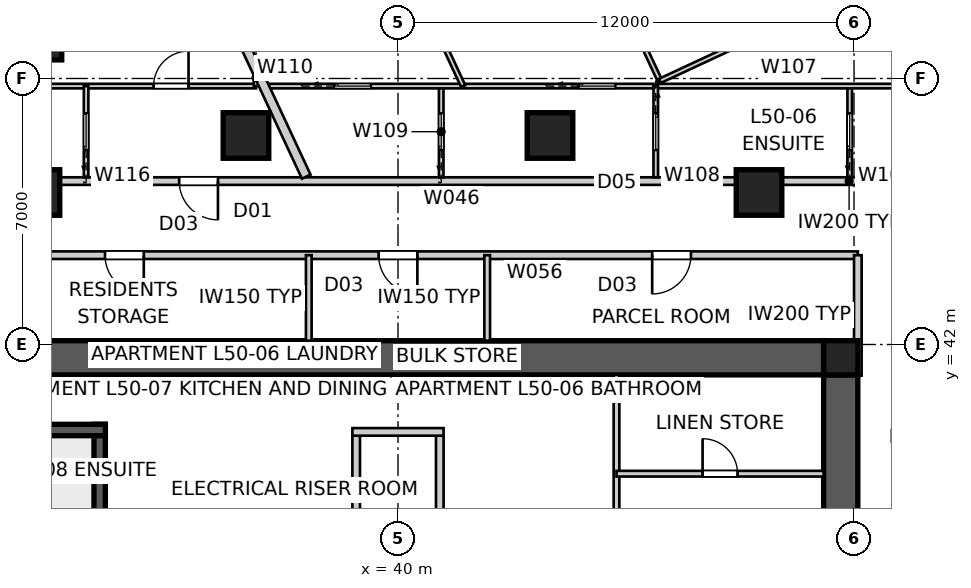
"""IFC4 building model, lengths in metres.
Left out: names, types, materials, properties, quantities, classifications, styles, units other than length and angle.
Written with IfcOpenShell. Run it as: python <this file> out.ifc"""

import sys

from ifc_helpers import new_model, si_unit, direction, frame, frame_2d, origin, origin_2d, place, context, subcontext, project, spatial, polyline, rectangle, outline, extrude, element, fill, save


model = new_model("IFC4")
c1 = context("Model", 3, precision=1e-05, world=origin(), true_north=direction((0.0, 1.0)))
c2 = subcontext(c1, "Body", "Model", "MODEL_VIEW")
j1 = project(units=[si_unit("LENGTHUNIT", "METRE"), si_unit("PLANEANGLEUNIT", "RADIAN")], contexts=[c1])
p1 = place(None, origin())
s1 = spatial("IfcSite", under=j1, at=p1, CompositionType="ELEMENT")
p2 = place(p1, origin())
s2 = spatial("IfcBuilding", under=s1, at=p2, CompositionType="ELEMENT")
p3 = place(p2, frame((0.0, 0.0, 182.8)))
s3 = spatial("IfcBuildingStorey", under=s2, at=p3, CompositionType="ELEMENT", Elevation=182.8)
p4 = place(p3, frame((28.8, 41.65, 0.0), z_axis=(0.0, 0.0, 1.0), x_axis=(1.0, 0.0, 0.0)))
e1 = element("IfcWall", 1, at=p4, inside=s3, PredefinedType="SHEAR", context=c2, shape_type="SweptSolid", body=[
    extrude(outline(polyline([(0.0, -0.45), (22.4, -0.45), (22.4, -0.025), (22.85, -0.025), (22.85, 0.025), (22.4, 0.025), (22.4, 0.45), (0.0, 0.45), (0.0, 0.025), (-0.45, 0.025), (-0.45, -0.025), (0.0, -0.025), (0.0, -0.45)])), origin(), (0.0, 0.0, 1.0), 3.4),
])
p5 = place(p3, frame((51.65, 18.8, 0.0), z_axis=(0.0, 0.0, 1.0), x_axis=(0.0, 1.0, 0.0)))
e2 = element("IfcWall", 2, at=p5, inside=s3, PredefinedType="SHEAR", context=c2, shape_type="SweptSolid", body=[
    extrude(outline(polyline([(0.0, -0.45), (22.4, -0.45), (22.4, -0.025), (22.85, -0.025), (22.85, 0.025), (22.4, 0.025), (22.4, 0.45), (0.0, 0.45), (0.0, 0.025), (-0.45, 0.025), (-0.45, -0.025), (0.0, -0.025), (0.0, -0.45)])), origin(), (0.0, 0.0, 1.0), 3.4),
])
p6 = place(p5, frame((11.14, 0.0, 0.0)))
e3 = element("IfcOpeningElement", 3, at=p6, cuts=e2, PredefinedType="OPENING", context=c2, shape_type="SweptSolid", body=[
    extrude(rectangle(XDim=1.02, YDim=2.4, at=frame_2d((0.51, 1.2))), frame((0.0, 0.46, 0.0), z_axis=(0.0, -1.0, 0.0), x_axis=(1.0, 0.0, 0.0)), (0.0, 0.0, 1.0), 0.92),
])
p7 = place(p3, frame((32.15, 32.2, 0.0), z_axis=(0.0, 0.0, 1.0), x_axis=(0.0, 1.0, 0.0)))
e4 = element("IfcWall", 4, at=p7, inside=s3, PredefinedType="SHEAR", context=c2, shape_type="SweptSolid", body=[
    extrude(rectangle(XDim=7.7, YDim=0.3, at=frame_2d((3.85, 0.0))), origin(), (0.0, 0.0, 1.0), 3.4),
])
p8 = place(p3, frame((28.8, 39.75, 0.0), z_axis=(0.0, 0.0, 1.0), x_axis=(1.0, 0.0, 0.0)))
e5 = element("IfcWall", 5, at=p8, inside=s3, PredefinedType="SHEAR", context=c2, shape_type="SweptSolid", body=[
    extrude(rectangle(XDim=3.5, YDim=0.3, at=frame_2d((1.75, 0.0))), origin(), (0.0, 0.0, 1.0), 3.4),
])
for number, where, z_axis, x_axis in (
    (6, (38.9, 37.6, 0.0), (0.0, 0.0, 1.0), (0.0, 1.0, 0.0)),
    (7, (41.1, 37.6, 0.0), (0.0, 0.0, 1.0), (0.0, 1.0, 0.0)),
):
    element("IfcWall", number, at=place(p3, frame(where, z_axis=z_axis, x_axis=x_axis)), inside=s3, PredefinedType="SOLIDWALL", context=c2, shape_type="SweptSolid", body=[
        extrude(rectangle(XDim=2.0, YDim=0.2, at=frame_2d((1.0, 0.0))), origin(), (0.0, 0.0, 1.0), 3.4),
    ])
p9 = place(p3, frame((38.8, 39.7, 0.0), z_axis=(0.0, 0.0, 1.0), x_axis=(1.0, 0.0, 0.0)))
e8 = element("IfcWall", 8, at=p9, inside=s3, PredefinedType="SOLIDWALL", context=c2, shape_type="SweptSolid", body=[
    extrude(rectangle(XDim=2.4, YDim=0.2, at=frame_2d((1.2, 0.0))), origin(), (0.0, 0.0, 1.0), 3.4),
])
for number, where, z_axis, x_axis in (
    (9, (51.65, 41.65, 0.0), (0.0, 0.0, 1.0), (1.0, 0.0, 0.0)),
    (10, (30.702, 49.939, 0.0), (0.0, 0.0, 1.0), (1.0, 0.0, 0.0)),
):
    element("IfcColumn", number, at=place(p3, frame(where, z_axis=z_axis, x_axis=x_axis)), inside=s3, PredefinedType="COLUMN", context=c2, shape_type="SweptSolid", body=[
        extrude(rectangle(XDim=0.9, YDim=0.9, at=origin_2d()), origin(), (0.0, 0.0, 1.0), 3.4),
    ])
for number, where, z_axis, x_axis in (
    (11, (49.5, 46.0, 0.0), (0.0, 0.0, 1.0), (1.0, 0.0, 0.0)),
    (12, (44.0, 47.5, 0.0), (0.0, 0.0, 1.0), (1.0, 0.0, 0.0)),
    (13, (36.0, 47.5, 0.0), (0.0, 0.0, 1.0), (1.0, 0.0, 0.0)),
    (14, (30.5, 46.0, 0.0), (0.0, 0.0, 1.0), (1.0, 0.0, 0.0)),
):
    element("IfcColumn", number, at=place(p3, frame(where, z_axis=z_axis, x_axis=x_axis)), inside=s3, PredefinedType="COLUMN", context=c2, shape_type="SweptSolid", body=[
        extrude(rectangle(XDim=1.2, YDim=1.2, at=origin_2d()), origin(), (0.0, 0.0, 1.0), 3.4),
    ])
p10 = place(p3, frame((54.5, 46.3, 0.0), z_axis=(0.0, 0.0, 1.0), x_axis=(-1.0, 0.0, 0.0)))
e15 = element("IfcWall", 15, at=p10, inside=s3, PredefinedType="PARTITIONING", context=c2, shape_type="SweptSolid", body=[
    extrude(rectangle(XDim=5.258, YDim=0.2, at=frame_2d((2.629, 0.0))), origin(), (0.0, 0.0, 1.0), 3.25),
])
p11 = place(p3, frame((49.242, 46.3, 0.0), z_axis=(0.0, 0.0, 1.0), x_axis=(-1.0, 0.0, 0.0)))
e16 = element("IfcWall", 16, at=p11, inside=s3, PredefinedType="PARTITIONING", context=c2, shape_type="SweptSolid", body=[
    extrude(rectangle(XDim=1.683, YDim=0.2, at=frame_2d((0.842, 0.0))), origin(), (0.0, 0.0, 1.0), 2.55),
])
p12 = place(p3, frame((47.558, 46.3, 0.0), z_axis=(0.0, 0.0, 1.0), x_axis=(-1.0, 0.0, 0.0)))
e17 = element("IfcWall", 17, at=p12, inside=s3, PredefinedType="PARTITIONING", context=c2, shape_type="SweptSolid", body=[
    extrude(rectangle(XDim=15.117, YDim=0.2, at=frame_2d((7.558, 0.0))), origin(), (0.0, 0.0, 1.0), 3.25),
])
p13 = place(p12, frame((12.295, 0.0, 0.0)))
e18 = element("IfcOpeningElement", 18, at=p13, cuts=e17, PredefinedType="OPENING", context=c2, shape_type="SweptSolid", body=[
    extrude(rectangle(XDim=1.02, YDim=2.34, at=frame_2d((0.51, 1.17))), frame((0.0, 0.11, 0.0), z_axis=(0.0, -1.0, 0.0), x_axis=(1.0, 0.0, 0.0)), (0.0, 0.0, 1.0), 0.22),
])
p14 = place(p3, frame((32.442, 46.3, 0.0), z_axis=(0.0, 0.0, 1.0), x_axis=(-1.0, 0.0, 0.0)))
e19 = element("IfcWall", 19, at=p14, inside=s3, PredefinedType="PARTITIONING", context=c2, shape_type="SweptSolid", body=[
    extrude(rectangle(XDim=1.683, YDim=0.2, at=frame_2d((0.842, 0.0))), origin(), (0.0, 0.0, 1.0), 2.55),
])
p15 = place(p3, frame((34.585, 52.853, 0.0), z_axis=(0.0, 0.0, 1.0), x_axis=(0.422623839356, -0.906305186131, 0.0)))
e20 = element("IfcWall", 20, at=p15, inside=s3, PredefinedType="PARTITIONING", context=c2, shape_type="SweptSolid", body=[
    extrude(rectangle(XDim=7.101, YDim=0.25, at=frame_2d((3.551, 0.0))), origin(), (0.0, 0.0, 1.0), 3.25),
])
p16 = place(p3, frame((45.75, 41.2, 0.0), z_axis=(0.0, 0.0, 1.0), x_axis=(0.0, -1.0, 0.0)))
e21 = element("IfcWall", 21, at=p16, inside=s3, PredefinedType="SOLIDWALL", context=c2, shape_type="SweptSolid", body=[
    extrude(rectangle(XDim=5.9, YDim=0.15, at=frame_2d((2.95, 0.0))), origin(), (0.0, 0.0, 1.0), 3.25),
])
p17 = place(p3, frame((45.75, 38.6, 0.0), z_axis=(0.0, 0.0, 1.0), x_axis=(1.0, 0.0, 0.0)))
e22 = element("IfcWall", 22, at=p17, inside=s3, PredefinedType="SOLIDWALL", context=c2, shape_type="SweptSolid", body=[
    extrude(rectangle(XDim=5.45, YDim=0.15, at=frame_2d((2.725, 0.0))), origin(), (0.0, 0.0, 1.0), 3.25),
])
p18 = place(p17, frame((2.265, 0.0, 0.0)))
e23 = element("IfcOpeningElement", 23, at=p18, cuts=e22, PredefinedType="OPENING", context=c2, shape_type="SweptSolid", body=[
    extrude(rectangle(XDim=0.92, YDim=2.1, at=frame_2d((0.46, 1.05))), frame((0.0, 0.085, 0.0), z_axis=(0.0, -1.0, 0.0), x_axis=(1.0, 0.0, 0.0)), (0.0, 0.0, 1.0), 0.17),
])
p19 = place(p3, frame((52.1, 44.35, 0.0), z_axis=(0.0, 0.0, 1.0), x_axis=(-1.0, 0.0, 0.0)))
e24 = element("IfcWall", 24, at=p19, inside=s3, PredefinedType="PARTITIONING", context=c2, shape_type="SweptSolid", body=[
    extrude(rectangle(XDim=24.2, YDim=0.2, at=frame_2d((12.1, 0.0))), origin(), (0.0, 0.0, 1.0), 3.25),
])
p20 = place(p19, frame((18.789, 0.0, 0.0)))
e25 = element("IfcOpeningElement", 25, at=p20, cuts=e24, PredefinedType="OPENING", context=c2, shape_type="SweptSolid", body=[
    extrude(rectangle(XDim=1.02, YDim=2.1, at=frame_2d((0.51, 1.05))), frame((0.0, 0.11, 0.0), z_axis=(0.0, -1.0, 0.0), x_axis=(1.0, 0.0, 0.0)), (0.0, 0.0, 1.0), 0.22),
])
p21 = place(p19, frame((4.391, 0.0, 0.0)))
e26 = element("IfcOpeningElement", 26, at=p21, cuts=e24, PredefinedType="OPENING", context=c2, shape_type="SweptSolid", body=[
    extrude(rectangle(XDim=1.02, YDim=2.1, at=frame_2d((0.51, 1.05))), frame((0.0, 0.11, 0.0), z_axis=(0.0, -1.0, 0.0), x_axis=(1.0, 0.0, 0.0)), (0.0, 0.0, 1.0), 0.22),
])
p22 = place(p19, frame((11.59, 0.0, 0.0)))
e27 = element("IfcOpeningElement", 27, at=p22, cuts=e24, PredefinedType="OPENING", context=c2, shape_type="SweptSolid", body=[
    extrude(rectangle(XDim=1.02, YDim=2.1, at=frame_2d((0.51, 1.05))), frame((0.0, 0.11, 0.0), z_axis=(0.0, -1.0, 0.0), x_axis=(1.0, 0.0, 0.0)), (0.0, 0.0, 1.0), 0.22),
])
p23 = place(p3, frame((52.1, 41.18, 0.0), z_axis=(0.0, 0.0, 1.0), x_axis=(0.0, 1.0, 0.0)))
e28 = element("IfcWall", 28, at=p23, inside=s3, PredefinedType="PARTITIONING", context=c2, shape_type="SweptSolid", body=[
    extrude(rectangle(XDim=3.17, YDim=0.2, at=frame_2d((1.585, 0.0))), origin(), (0.0, 0.0, 1.0), 3.25),
])
for number, where, z_axis, x_axis in (
    (29, (37.653, 42.1, 0.0), (0.0, 0.0, 1.0), (0.0, 1.0, 0.0)),
    (30, (42.347, 42.1, 0.0), (0.0, 0.0, 1.0), (0.0, 1.0, 0.0)),
):
    element("IfcWall", number, at=place(p3, frame(where, z_axis=z_axis, x_axis=x_axis)), inside=s3, PredefinedType="SOLIDWALL", context=c2, shape_type="SweptSolid", body=[
        extrude(rectangle(XDim=2.25, YDim=0.15, at=frame_2d((1.125, 0.0))), origin(), (0.0, 0.0, 1.0), 3.25),
    ])
p24 = place(p3, frame((51.886, 46.4, 0.0), z_axis=(0.0, 0.0, 1.0), x_axis=(0.0, 1.0, 0.0)))
e31 = element("IfcWall", 31, at=p24, inside=s3, PredefinedType="PARTITIONING", context=c2, shape_type="SweptSolid", body=[
    extrude(rectangle(XDim=2.4, YDim=0.12, at=frame_2d((1.2, 0.0))), origin(), (0.0, 0.0, 1.0), 3.25),
])
p25 = place(p24, frame((0.72, 0.0, 0.0)))
e32 = element("IfcOpeningElement", 32, at=p25, cuts=e31, PredefinedType="OPENING", context=c2, shape_type="SweptSolid", body=[
    extrude(rectangle(XDim=0.96, YDim=2.1, at=frame_2d((0.48, 1.05))), frame((0.0, 0.07, 0.0), z_axis=(0.0, -1.0, 0.0), x_axis=(1.0, 0.0, 0.0)), (0.0, 0.0, 1.0), 0.14),
])
p26 = place(p3, frame((46.783, 48.8, 0.0), z_axis=(0.0, 0.0, 1.0), x_axis=(1.0, 0.0, 0.0)))
e33 = element("IfcWall", 33, at=p26, inside=s3, PredefinedType="PARTITIONING", context=c2, shape_type="SweptSolid", body=[
    extrude(rectangle(XDim=9.784, YDim=0.12, at=frame_2d((4.892, 0.0))), origin(), (0.0, 0.0, 1.0), 3.25),
])
p27 = place(p26, frame((7.006, 0.0, 0.0)))
e34 = element("IfcOpeningElement", 34, at=p27, cuts=e33, PredefinedType="OPENING", context=c2, shape_type="SweptSolid", body=[
    extrude(rectangle(XDim=0.92, YDim=2.34, at=frame_2d((0.46, 1.17))), frame((0.0, 0.07, 0.0), z_axis=(0.0, -1.0, 0.0), x_axis=(1.0, 0.0, 0.0)), (0.0, 0.0, 1.0), 0.14),
])
p28 = place(p3, frame((46.783, 48.8, 0.0), z_axis=(0.0, 0.0, 1.0), x_axis=(0.0, -1.0, 0.0)))
e35 = element("IfcWall", 35, at=p28, inside=s3, PredefinedType="PARTITIONING", context=c2, shape_type="SweptSolid", body=[
    extrude(rectangle(XDim=2.4, YDim=0.12, at=frame_2d((1.2, 0.0))), origin(), (0.0, 0.0, 1.0), 3.25),
])
p29 = place(p28, frame((0.72, 0.0, 0.0)))
e36 = element("IfcOpeningElement", 36, at=p29, cuts=e35, PredefinedType="OPENING", context=c2, shape_type="SweptSolid", body=[
    extrude(rectangle(XDim=0.96, YDim=2.1, at=frame_2d((0.48, 1.05))), frame((0.0, 0.07, 0.0), z_axis=(0.0, -1.0, 0.0), x_axis=(1.0, 0.0, 0.0)), (0.0, 0.0, 1.0), 0.14),
])
p30 = place(p3, frame((41.137, 46.4, 0.0), z_axis=(0.0, 0.0, 1.0), x_axis=(0.0, 1.0, 0.0)))
e37 = element("IfcWall", 37, at=p30, inside=s3, PredefinedType="PARTITIONING", context=c2, shape_type="SweptSolid", body=[
    extrude(rectangle(XDim=2.4, YDim=0.12, at=frame_2d((1.2, 0.0))), origin(), (0.0, 0.0, 1.0), 3.25),
])
p31 = place(p30, frame((0.72, 0.0, 0.0)))
e38 = element("IfcOpeningElement", 38, at=p31, cuts=e37, PredefinedType="OPENING", context=c2, shape_type="SweptSolid", body=[
    extrude(rectangle(XDim=0.96, YDim=2.1, at=frame_2d((0.48, 1.05))), frame((0.0, 0.07, 0.0), z_axis=(0.0, -1.0, 0.0), x_axis=(1.0, 0.0, 0.0)), (0.0, 0.0, 1.0), 0.14),
])
p32 = place(p3, frame((36.475, 48.8, 0.0), z_axis=(0.0, 0.0, 1.0), x_axis=(1.0, 0.0, 0.0)))
e39 = element("IfcWall", 39, at=p32, inside=s3, PredefinedType="PARTITIONING", context=c2, shape_type="SweptSolid", body=[
    extrude(rectangle(XDim=10.242, YDim=0.12, at=frame_2d((5.121, 0.0))), origin(), (0.0, 0.0, 1.0), 3.25),
])
p33 = place(p32, frame((8.284, 0.0, 0.0)))
e40 = element("IfcOpeningElement", 40, at=p33, cuts=e39, PredefinedType="OPENING", context=c2, shape_type="SweptSolid", body=[
    extrude(rectangle(XDim=0.96, YDim=2.1, at=frame_2d((0.48, 1.05))), frame((0.0, 0.07, 0.0), z_axis=(0.0, -1.0, 0.0), x_axis=(1.0, 0.0, 0.0)), (0.0, 0.0, 1.0), 0.14),
])
p34 = place(p32, frame((1.851, 0.0, 0.0)))
e41 = element("IfcOpeningElement", 41, at=p34, cuts=e39, PredefinedType="OPENING", context=c2, shape_type="SweptSolid", body=[
    extrude(rectangle(XDim=0.96, YDim=2.1, at=frame_2d((0.48, 1.05))), frame((0.0, 0.07, 0.0), z_axis=(0.0, -1.0, 0.0), x_axis=(1.0, 0.0, 0.0)), (0.0, 0.0, 1.0), 0.14),
])
p35 = place(p3, frame((46.893, 48.937, 0.0), z_axis=(0.0, 0.0, 1.0), x_axis=(-0.422638395676, 0.906298398156, 0.0)))
e42 = element("IfcWall", 42, at=p35, inside=s3, PredefinedType="PARTITIONING", context=c2, shape_type="SweptSolid", body=[
    extrude(rectangle(XDim=8.71, YDim=0.12, at=frame_2d((4.355, 0.0))), origin(), (0.0, 0.0, 1.0), 3.25),
])
p36 = place(p3, frame((54.787, 52.618, 0.0), z_axis=(0.0, 0.0, 1.0), x_axis=(-0.906314140712, -0.422604635972, 0.0)))
e43 = element("IfcWall", 43, at=p36, inside=s3, PredefinedType="PARTITIONING", context=c2, shape_type="SweptSolid", body=[
    extrude(rectangle(XDim=8.71, YDim=0.12, at=frame_2d((4.355, 0.0))), origin(), (0.0, 0.0, 1.0), 3.25),
])
p37 = place(p36, frame((3.875, 0.0, 0.0)))
e44 = element("IfcOpeningElement", 44, at=p37, cuts=e43, PredefinedType="OPENING", context=c2, shape_type="SweptSolid", body=[
    extrude(rectangle(XDim=0.92, YDim=2.34, at=frame_2d((0.46, 1.17))), frame((0.0, 0.07, 0.0), z_axis=(0.0, -1.0, 0.0), x_axis=(1.0, 0.0, 0.0)), (0.0, 0.0, 1.0), 0.14),
])
p38 = place(p3, frame((41.716, 48.8, 0.0), z_axis=(0.0, 0.0, 1.0), x_axis=(-0.422642131948, 0.906296655793, 0.0)))
e45 = element("IfcWall", 45, at=p38, inside=s3, PredefinedType="PARTITIONING", context=c2, shape_type="SweptSolid", body=[
    extrude(rectangle(XDim=6.646, YDim=0.12, at=frame_2d((3.323, 0.0))), origin(), (0.0, 0.0, 1.0), 3.25),
])
p39 = place(p3, frame((25.993, 48.8, 0.0), z_axis=(0.0, 0.0, 1.0), x_axis=(1.0, 0.0, 0.0)))
e46 = element("IfcWall", 46, at=p39, inside=s3, PredefinedType="PARTITIONING", context=c2, shape_type="SweptSolid", body=[
    extrude(rectangle(XDim=10.272, YDim=0.12, at=frame_2d((5.136, 0.0))), origin(), (0.0, 0.0, 1.0), 3.25),
])
p40 = place(p39, frame((7.576, 0.0, 0.0)))
e47 = element("IfcOpeningElement", 47, at=p40, cuts=e46, PredefinedType="OPENING", context=c2, shape_type="SweptSolid", body=[
    extrude(rectangle(XDim=0.92, YDim=2.34, at=frame_2d((0.46, 1.17))), frame((0.0, 0.07, 0.0), z_axis=(0.0, -1.0, 0.0), x_axis=(1.0, 0.0, 0.0)), (0.0, 0.0, 1.0), 0.14),
])
p41 = place(p3, frame((36.265, 48.8, 0.0), z_axis=(0.0, 0.0, 1.0), x_axis=(0.0, 1.0, 0.0)))
e48 = element("IfcWall", 48, at=p41, inside=s3, PredefinedType="PARTITIONING", context=c2, shape_type="SweptSolid", body=[
    extrude(rectangle(XDim=0.45, YDim=0.12, at=frame_2d((0.225, 0.0))), origin(), (0.0, 0.0, 1.0), 3.25),
])
p42 = place(p3, frame((31.793, 46.4, 0.0), z_axis=(0.0, 0.0, 1.0), x_axis=(0.0, 1.0, 0.0)))
e49 = element("IfcWall", 49, at=p42, inside=s3, PredefinedType="PARTITIONING", context=c2, shape_type="SweptSolid", body=[
    extrude(rectangle(XDim=2.4, YDim=0.12, at=frame_2d((1.2, 0.0))), origin(), (0.0, 0.0, 1.0), 3.25),
])
p43 = place(p42, frame((0.72, 0.0, 0.0)))
e50 = element("IfcOpeningElement", 50, at=p43, cuts=e49, PredefinedType="OPENING", context=c2, shape_type="SweptSolid", body=[
    extrude(rectangle(XDim=0.96, YDim=2.1, at=frame_2d((0.48, 1.05))), frame((0.0, 0.07, 0.0), z_axis=(0.0, -1.0, 0.0), x_axis=(1.0, 0.0, 0.0)), (0.0, 0.0, 1.0), 0.14),
])
p44 = place(p20, origin())
e51 = element("IfcDoor", 51, at=p44, inside=s3, OperationType="SINGLE_SWING_LEFT", PredefinedType="DOOR", context=c2, shape_type="SweptSolid", body=[
    extrude(rectangle(XDim=1.02, YDim=2.1, at=frame_2d((0.51, 1.05))), frame((0.0, 0.025, 0.0), z_axis=(0.0, -1.0, 0.0), x_axis=(1.0, 0.0, 0.0)), (0.0, 0.0, 1.0), 0.05),
])
fill(e25, e51)
p45 = place(p21, origin())
e52 = element("IfcDoor", 52, at=p45, inside=s3, OperationType="SINGLE_SWING_RIGHT", PredefinedType="DOOR", context=c2, shape_type="SweptSolid", body=[
    extrude(rectangle(XDim=1.02, YDim=2.1, at=frame_2d((0.51, 1.05))), frame((0.0, 0.025, 0.0), z_axis=(0.0, -1.0, 0.0), x_axis=(1.0, 0.0, 0.0)), (0.0, 0.0, 1.0), 0.05),
])
fill(e26, e52)
p46 = place(p13, origin())
e53 = element("IfcDoor", 53, at=p46, inside=s3, OperationType="SINGLE_SWING_LEFT", PredefinedType="DOOR", context=c2, shape_type="SweptSolid", body=[
    extrude(rectangle(XDim=1.02, YDim=2.34, at=frame_2d((0.51, 1.17))), frame((0.0, 0.025, 0.0), z_axis=(0.0, -1.0, 0.0), x_axis=(1.0, 0.0, 0.0)), (0.0, 0.0, 1.0), 0.05),
])
fill(e18, e53)
p47 = place(p22, origin())
e54 = element("IfcDoor", 54, at=p47, inside=s3, OperationType="SINGLE_SWING_LEFT", PredefinedType="DOOR", context=c2, shape_type="SweptSolid", body=[
    extrude(rectangle(XDim=1.02, YDim=2.1, at=frame_2d((0.51, 1.05))), frame((0.0, 0.025, 0.0), z_axis=(0.0, -1.0, 0.0), x_axis=(1.0, 0.0, 0.0)), (0.0, 0.0, 1.0), 0.05),
])
fill(e27, e54)
p48 = place(p18, origin())
e55 = element("IfcDoor", 55, at=p48, inside=s3, OperationType="SINGLE_SWING_LEFT", PredefinedType="DOOR", context=c2, shape_type="SweptSolid", body=[
    extrude(rectangle(XDim=0.92, YDim=2.1, at=frame_2d((0.46, 1.05))), frame((0.0, 0.025, 0.0), z_axis=(0.0, -1.0, 0.0), x_axis=(1.0, 0.0, 0.0)), (0.0, 0.0, 1.0), 0.05),
])
fill(e23, e55)
p49 = place(p40, origin())
e56 = element("IfcDoor", 56, at=p49, inside=s3, OperationType="SINGLE_SWING_RIGHT", PredefinedType="DOOR", context=c2, shape_type="SweptSolid", body=[
    extrude(rectangle(XDim=0.92, YDim=2.34, at=frame_2d((0.46, 1.17))), frame((0.0, 0.025, 0.0), z_axis=(0.0, -1.0, 0.0), x_axis=(1.0, 0.0, 0.0)), (0.0, 0.0, 1.0), 0.05),
])
fill(e47, e56)
p50 = place(p43, origin())
e57 = element("IfcDoor", 57, at=p50, inside=s3, OperationType="SLIDING_TO_LEFT", PredefinedType="DOOR", context=c2, shape_type="SweptSolid", body=[
    extrude(rectangle(XDim=0.96, YDim=2.1, at=frame_2d((0.48, 1.05))), frame((0.0, 0.025, 0.0), z_axis=(0.0, -1.0, 0.0), x_axis=(1.0, 0.0, 0.0)), (0.0, 0.0, 1.0), 0.05),
])
fill(e50, e57)
p51 = place(p25, origin())
e58 = element("IfcDoor", 58, at=p51, inside=s3, OperationType="SLIDING_TO_LEFT", PredefinedType="DOOR", context=c2, shape_type="SweptSolid", body=[
    extrude(rectangle(XDim=0.96, YDim=2.1, at=frame_2d((0.48, 1.05))), frame((0.0, 0.025, 0.0), z_axis=(0.0, -1.0, 0.0), x_axis=(1.0, 0.0, 0.0)), (0.0, 0.0, 1.0), 0.05),
])
fill(e32, e58)
p52 = place(p29, origin())
e59 = element("IfcDoor", 59, at=p52, inside=s3, OperationType="SLIDING_TO_LEFT", PredefinedType="DOOR", context=c2, shape_type="SweptSolid", body=[
    extrude(rectangle(XDim=0.96, YDim=2.1, at=frame_2d((0.48, 1.05))), frame((0.0, 0.025, 0.0), z_axis=(0.0, -1.0, 0.0), x_axis=(1.0, 0.0, 0.0)), (0.0, 0.0, 1.0), 0.05),
])
fill(e36, e59)
p53 = place(p33, origin())
e60 = element("IfcDoor", 60, at=p53, inside=s3, OperationType="SLIDING_TO_LEFT", PredefinedType="DOOR", context=c2, shape_type="SweptSolid", body=[
    extrude(rectangle(XDim=0.96, YDim=2.1, at=frame_2d((0.48, 1.05))), frame((0.0, 0.025, 0.0), z_axis=(0.0, -1.0, 0.0), x_axis=(1.0, 0.0, 0.0)), (0.0, 0.0, 1.0), 0.05),
])
fill(e40, e60)
p54 = place(p31, origin())
e61 = element("IfcDoor", 61, at=p54, inside=s3, OperationType="SLIDING_TO_LEFT", PredefinedType="DOOR", context=c2, shape_type="SweptSolid", body=[
    extrude(rectangle(XDim=0.96, YDim=2.1, at=frame_2d((0.48, 1.05))), frame((0.0, 0.025, 0.0), z_axis=(0.0, -1.0, 0.0), x_axis=(1.0, 0.0, 0.0)), (0.0, 0.0, 1.0), 0.05),
])
fill(e38, e61)
p55 = place(p34, origin())
e62 = element("IfcDoor", 62, at=p55, inside=s3, OperationType="SLIDING_TO_LEFT", PredefinedType="DOOR", context=c2, shape_type="SweptSolid", body=[
    extrude(rectangle(XDim=0.96, YDim=2.1, at=frame_2d((0.48, 1.05))), frame((0.0, 0.025, 0.0), z_axis=(0.0, -1.0, 0.0), x_axis=(1.0, 0.0, 0.0)), (0.0, 0.0, 1.0), 0.05),
])
fill(e41, e62)
save(model, sys.argv[1])
